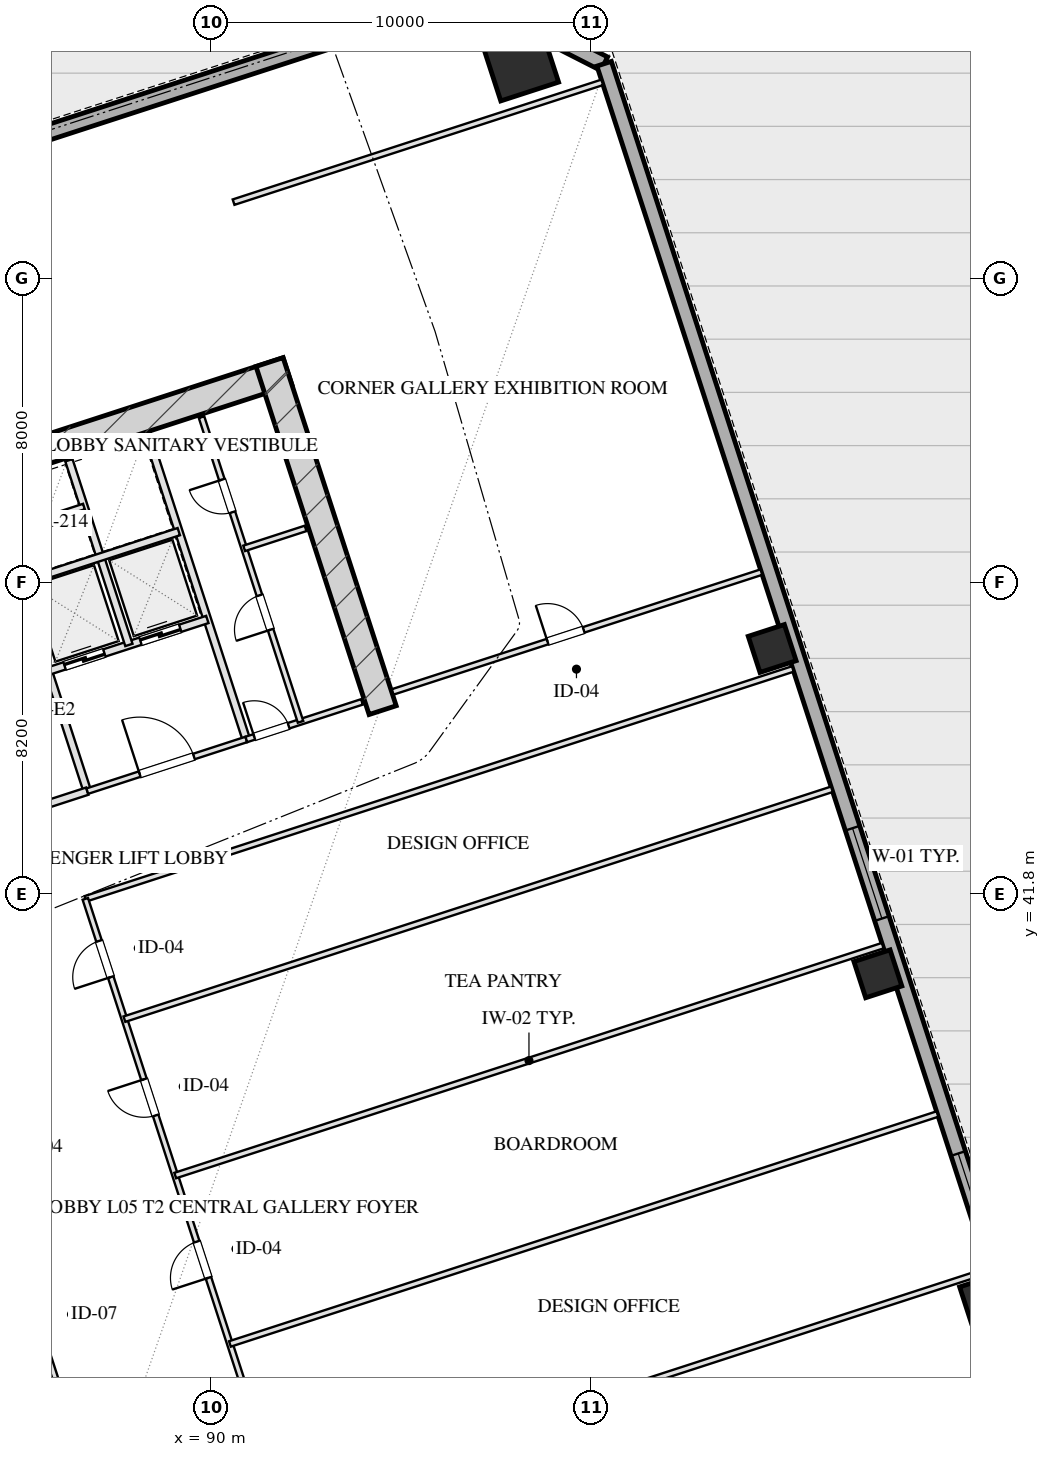
"""IFC4 building model, lengths in metres.
Left out: names, types, materials, properties, quantities, classifications, styles, units other than length and angle.
Written with IfcOpenShell. Run it as: python <this file> out.ifc"""

import sys

from ifc_helpers import new_model, si_unit, direction, frame, frame_2d, origin, origin_2d, place, context, subcontext, project, spatial, rectangle, hollow_rectangle, extrude, element, fill, save


model = new_model("IFC4")
c1 = context("Model", 3, precision=1e-05, world=origin(), true_north=direction((0.0, 1.0)))
c2 = subcontext(c1, "Body", "Model", "MODEL_VIEW")
j1 = project(units=[si_unit("LENGTHUNIT", "METRE"), si_unit("PLANEANGLEUNIT", "RADIAN")], contexts=[c1])
p1 = place(None, origin())
s1 = spatial("IfcSite", under=j1, at=p1, CompositionType="ELEMENT")
p2 = place(p1, origin())
s2 = spatial("IfcBuilding", under=s1, at=p2, CompositionType="ELEMENT")
p3 = place(p2, frame((0.0, 0.0, 26.0)))
s3 = spatial("IfcBuildingStorey", under=s2, at=p3, CompositionType="ELEMENT", Elevation=26.0)
p4 = place(p3, frame((76.272, 50.443, 0.0), z_axis=(0.0, 0.0, 1.0), x_axis=(0.951056072937, 0.309018358888, 0.0)))
e1 = element("IfcWall", 1, at=p4, inside=s3, PredefinedType="SHEAR", context=c2, shape_type="SweptSolid", body=[
    extrude(rectangle(XDim=16.55, YDim=0.75, at=frame_2d((8.275, 0.0))), origin(), (0.0, 0.0, 1.0), 4.0),
])
p5 = place(p3, frame((94.515, 46.639, 0.0), z_axis=(0.0, 0.0, 1.0), x_axis=(-0.309016134813, 0.951056795583, 0.0)))
e2 = element("IfcWall", 2, at=p5, inside=s3, PredefinedType="SHEAR", context=c2, shape_type="SweptSolid", body=[
    extrude(rectangle(XDim=9.63, YDim=0.75, at=frame_2d((4.815, 0.0))), origin(), (0.0, 0.0, 1.0), 4.0),
])
p6 = place(p3, frame((98.137, 63.677, 0.0), z_axis=(0.0, 0.0, 1.0), x_axis=(0.951056516295, 0.309016994375, 0.0)))
e3 = element("IfcColumn", 3, at=p6, inside=s3, PredefinedType="COLUMN", context=c2, shape_type="SweptSolid", body=[
    extrude(hollow_rectangle(XDim=1.6, YDim=1.6, WallThickness=0.055, at=origin_2d()), origin(), (0.0, 0.0, 1.0), 4.001),
])
for number, where, z_axis, x_axis in (
    (4, (110.328, 31.142, 0.0), (0.0, 0.0, 1.0), (0.951, 0.309, 0.0)),
    (5, (107.547, 39.701, 0.0), (0.0, 0.0, 1.0), (0.951, 0.309, 0.0)),
    (6, (104.766, 48.261, 0.0), (0.0, 0.0, 1.0), (0.951, 0.309, 0.0)),
):
    element("IfcColumn", number, at=place(p3, frame(where, z_axis=z_axis, x_axis=x_axis)), inside=s3, PredefinedType="COLUMN", context=c2, shape_type="SweptSolid", body=[
        extrude(hollow_rectangle(XDim=1.0, YDim=1.0, WallThickness=0.036, at=origin_2d()), origin(), (0.0, 0.0, 1.0), 4.001),
    ])
p7 = place(p3, frame((66.002, 55.433, 0.0), z_axis=(0.0, 0.0, 1.0), x_axis=(0.951055939317, 0.309018770125, 0.0)))
e7 = element("IfcWall", 7, at=p7, inside=s3, PredefinedType="SOLIDWALL", context=c2, shape_type="SweptSolid", body=[
    extrude(rectangle(XDim=32.4, YDim=0.4, at=frame_2d((16.2, 0.0))), origin(), (0.0, 0.0, 1.0), 3.16),
])
p8 = place(p3, frame((96.816, 65.446, 0.0), z_axis=(0.0, 0.0, 1.0), x_axis=(0.890998089617, -0.454007053137, 0.0)))
e8 = element("IfcWall", 8, at=p8, inside=s3, PredefinedType="SOLIDWALL", context=c2, shape_type="SweptSolid", body=[
    extrude(rectangle(XDim=3.96, YDim=0.4, at=frame_2d((1.98, 0.0))), origin(), (0.0, 0.0, 1.0), 3.16),
])
p9 = place(p3, frame((100.345, 63.648, 0.0), z_axis=(0.0, 0.0, 1.0), x_axis=(0.309014526607, -0.951057318118, 0.0)))
e9 = element("IfcWall", 9, at=p9, inside=s3, PredefinedType="SOLIDWALL", context=c2, shape_type="SweptSolid", body=[
    extrude(rectangle(XDim=50.0, YDim=0.4, at=frame_2d((25.0, 0.0))), origin(), (0.0, 0.0, 1.0), 3.16),
])
p10 = place(p9, frame((30.15, 0.0, 0.75)))
e10 = element("IfcOpeningElement", 10, at=p10, cuts=e9, PredefinedType="OPENING", context=c2, shape_type="SweptSolid", body=[
    extrude(rectangle(XDim=2.5, YDim=1.75, at=frame_2d((1.25, 0.875))), frame((0.0, 0.21, 0.0), z_axis=(0.0, -1.0, 0.0), x_axis=(1.0, 0.0, 0.0)), (0.0, 0.0, 1.0), 0.42),
])
p11 = place(p9, frame((21.15, 0.0, 0.75)))
e11 = element("IfcOpeningElement", 11, at=p11, cuts=e9, PredefinedType="OPENING", context=c2, shape_type="SweptSolid", body=[
    extrude(rectangle(XDim=2.5, YDim=1.75, at=frame_2d((1.25, 0.875))), frame((0.0, 0.21, 0.0), z_axis=(0.0, -1.0, 0.0), x_axis=(1.0, 0.0, 0.0)), (0.0, 0.0, 1.0), 0.42),
])
p12 = place(p3, frame((86.743, 44.508, 0.0), z_axis=(0.0, 0.0, 1.0), x_axis=(-0.309016001439, 0.951056838919, 0.0)))
e12 = element("IfcWall", 12, at=p12, inside=s3, PredefinedType="PARTITIONING", context=c2, shape_type="SweptSolid", body=[
    extrude(rectangle(XDim=8.43, YDim=0.2, at=frame_2d((4.215, 0.0))), origin(), (0.0, 0.0, 1.0), 3.725),
])
p13 = place(p3, frame((83.101, 43.324, 0.0), z_axis=(0.0, 0.0, 1.0), x_axis=(0.951052804469, 0.309028417967, 0.0)))
e13 = element("IfcWall", 13, at=p13, inside=s3, PredefinedType="PARTITIONING", context=c2, shape_type="SweptSolid", body=[
    extrude(rectangle(XDim=3.83, YDim=0.2, at=frame_2d((1.915, 0.0))), origin(), (0.0, 0.0, 1.0), 3.725),
])
p14 = place(p13, frame((1.35, 0.0, 0.0)))
e14 = element("IfcOpeningElement", 14, at=p14, cuts=e13, PredefinedType="OPENING", context=c2, shape_type="SweptSolid", body=[
    extrude(rectangle(XDim=1.2, YDim=2.05, at=frame_2d((0.6, 1.025))), frame((0.0, 0.11, 0.0), z_axis=(0.0, -1.0, 0.0), x_axis=(1.0, 0.0, 0.0)), (0.0, 0.0, 1.0), 0.22),
])
p15 = place(p3, frame((90.928, 45.868, 0.0), z_axis=(0.0, 0.0, 1.0), x_axis=(-0.309042196757, 0.951048327176, 0.0)))
e15 = element("IfcWall", 15, at=p15, inside=s3, PredefinedType="PARTITIONING", context=c2, shape_type="SweptSolid", body=[
    extrude(rectangle(XDim=8.43, YDim=0.2, at=frame_2d((4.215, 0.0))), origin(), (0.0, 0.0, 1.0), 3.725),
])
p16 = place(p3, frame((86.743, 44.508, 0.0), z_axis=(0.0, 0.0, 1.0), x_axis=(0.951063829732, 0.308994485023, 0.0)))
e16 = element("IfcWall", 16, at=p16, inside=s3, PredefinedType="PARTITIONING", context=c2, shape_type="SweptSolid", body=[
    extrude(rectangle(XDim=4.4, YDim=0.15, at=frame_2d((2.2, 0.0))), origin(), (0.0, 0.0, 1.0), 3.725),
])
p17 = place(p16, frame((1.45, 0.0, 0.0)))
e17 = element("IfcOpeningElement", 17, at=p17, cuts=e16, PredefinedType="OPENING", context=c2, shape_type="SweptSolid", body=[
    extrude(rectangle(XDim=1.5, YDim=2.05, at=frame_2d((0.75, 1.025))), frame((0.0, 0.085, 0.0), z_axis=(0.0, -1.0, 0.0), x_axis=(1.0, 0.0, 0.0)), (0.0, 0.0, 1.0), 0.17),
])
p18 = place(p3, frame((85.718, 47.666, 0.0), z_axis=(0.0, 0.0, 1.0), x_axis=(0.951058531764, 0.30901079133, 0.0)))
e18 = element("IfcWall", 18, at=p18, inside=s3, PredefinedType="PARTITIONING", context=c2, shape_type="SweptSolid", body=[
    extrude(rectangle(XDim=4.4, YDim=0.2, at=frame_2d((2.2, 0.0))), origin(), (0.0, 0.0, 1.0), 3.725),
])
p19 = place(p18, frame((0.45, 0.0, 0.0)))
e19 = element("IfcOpeningElement", 19, at=p19, cuts=e18, PredefinedType="OPENING", context=c2, shape_type="SweptSolid", body=[
    extrude(rectangle(XDim=1.1, YDim=2.05, at=frame_2d((0.55, 1.025))), frame((0.0, 0.11, 0.0), z_axis=(0.0, -1.0, 0.0), x_axis=(1.0, 0.0, 0.0)), (0.0, 0.0, 1.0), 0.22),
])
p20 = place(p18, frame((2.55, 0.0, 0.0)))
e20 = element("IfcOpeningElement", 20, at=p20, cuts=e18, PredefinedType="OPENING", context=c2, shape_type="SweptSolid", body=[
    extrude(rectangle(XDim=1.1, YDim=2.05, at=frame_2d((0.55, 1.025))), frame((0.0, 0.11, 0.0), z_axis=(0.0, -1.0, 0.0), x_axis=(1.0, 0.0, 0.0)), (0.0, 0.0, 1.0), 0.22),
])
p21 = place(p3, frame((87.838, 48.354, 0.0), z_axis=(0.0, 0.0, 1.0), x_axis=(-0.3090093719, 0.951058992953, 0.0)))
e21 = element("IfcWall", 21, at=p21, inside=s3, PredefinedType="PARTITIONING", context=c2, shape_type="SweptSolid", body=[
    extrude(rectangle(XDim=5.11, YDim=0.2, at=frame_2d((2.555, 0.0))), origin(), (0.0, 0.0, 1.0), 3.725),
])
p22 = place(p3, frame((84.967, 49.977, 0.0), z_axis=(0.0, 0.0, 1.0), x_axis=(0.951063829732, 0.308994485023, 0.0)))
e22 = element("IfcWall", 22, at=p22, inside=s3, PredefinedType="PARTITIONING", context=c2, shape_type="SweptSolid", body=[
    extrude(rectangle(XDim=4.4, YDim=0.2, at=frame_2d((2.2, 0.0))), origin(), (0.0, 0.0, 1.0), 3.725),
])
p23 = place(p3, frame((84.534, 51.308, 0.0), z_axis=(0.0, 0.0, 1.0), x_axis=(0.951075093106, 0.308959814982, 0.0)))
e23 = element("IfcWall", 23, at=p23, inside=s3, PredefinedType="PARTITIONING", context=c2, shape_type="SweptSolid", body=[
    extrude(rectangle(XDim=2.23, YDim=0.15, at=frame_2d((1.115, 0.0))), origin(), (0.0, 0.0, 1.0), 3.725),
])
p24 = place(p3, frame((90.928, 45.868, 0.0), z_axis=(0.0, 0.0, 1.0), x_axis=(0.951059297078, 0.309008435874, 0.0)))
e24 = element("IfcWall", 24, at=p24, inside=s3, PredefinedType="PARTITIONING", context=c2, shape_type="SweptSolid", body=[
    extrude(rectangle(XDim=3.2, YDim=0.15, at=frame_2d((1.6, 0.0))), origin(), (0.0, 0.0, 1.0), 3.725),
])
p25 = place(p24, frame((0.22, 0.0, 0.0)))
e25 = element("IfcOpeningElement", 25, at=p25, cuts=e24, PredefinedType="OPENING", context=c2, shape_type="SweptSolid", body=[
    extrude(rectangle(XDim=0.95, YDim=2.05, at=frame_2d((0.475, 1.025))), frame((0.0, 0.085, 0.0), z_axis=(0.0, -1.0, 0.0), x_axis=(1.0, 0.0, 0.0)), (0.0, 0.0, 1.0), 0.17),
])
p26 = place(p3, frame((92.355, 46.331, 0.0), z_axis=(0.0, 0.0, 1.0), x_axis=(-0.309007490203, 0.951059604335, 0.0)))
e26 = element("IfcWall", 26, at=p26, inside=s3, PredefinedType="PARTITIONING", context=c2, shape_type="SweptSolid", body=[
    extrude(rectangle(XDim=8.43, YDim=0.15, at=frame_2d((4.215, 0.0))), origin(), (0.0, 0.0, 1.0), 3.725),
])
p27 = place(p26, frame((2.55, 0.0, 0.0)))
e27 = element("IfcOpeningElement", 27, at=p27, cuts=e26, PredefinedType="OPENING", context=c2, shape_type="SweptSolid", body=[
    extrude(rectangle(XDim=0.95, YDim=2.05, at=frame_2d((0.475, 1.025))), frame((0.0, 0.085, 0.0), z_axis=(0.0, -1.0, 0.0), x_axis=(1.0, 0.0, 0.0)), (0.0, 0.0, 1.0), 0.17),
])
p28 = place(p26, frame((5.8, 0.0, 0.0)))
e28 = element("IfcOpeningElement", 28, at=p28, cuts=e26, PredefinedType="OPENING", context=c2, shape_type="SweptSolid", body=[
    extrude(rectangle(XDim=0.9, YDim=2.05, at=frame_2d((0.45, 1.025))), frame((0.0, 0.085, 0.0), z_axis=(0.0, -1.0, 0.0), x_axis=(1.0, 0.0, 0.0)), (0.0, 0.0, 1.0), 0.17),
])
p29 = place(p3, frame((90.871, 50.896, 0.0), z_axis=(0.0, 0.0, 1.0), x_axis=(0.951054116971, 0.309024378638, 0.0)))
e29 = element("IfcWall", 29, at=p29, inside=s3, PredefinedType="PARTITIONING", context=c2, shape_type="SweptSolid", body=[
    extrude(rectangle(XDim=1.7, YDim=0.15, at=frame_2d((0.85, 0.0))), origin(), (0.0, 0.0, 1.0), 3.725),
])
p30 = place(p3, frame((101.578, 26.196, 0.0), z_axis=(0.0, 0.0, 1.0), x_axis=(0.951059043131, 0.309009217467, 0.0)))
e30 = element("IfcWall", 30, at=p30, inside=s3, PredefinedType="PARTITIONING", context=c2, shape_type="SweptSolid", body=[
    extrude(rectangle(XDim=10.2, YDim=0.15, at=frame_2d((5.1, 0.0))), origin(), (0.0, 0.0, 1.0), 3.725),
])
p31 = place(p30, frame((4.284, 0.0, 0.0)))
e31 = element("IfcOpeningElement", 31, at=p31, cuts=e30, PredefinedType="OPENING", context=c2, shape_type="SweptSolid", body=[
    extrude(rectangle(XDim=1.0, YDim=2.05, at=frame_2d((0.5, 1.025))), frame((0.0, 0.085, 0.0), z_axis=(0.0, -1.0, 0.0), x_axis=(1.0, 0.0, 0.0)), (0.0, 0.0, 1.0), 0.17),
])
p32 = place(p3, frame((90.593, 60.006, 0.0), z_axis=(0.0, 0.0, 1.0), x_axis=(0.951059043131, 0.309009217467, 0.0)))
e32 = element("IfcWall", 32, at=p32, inside=s3, PredefinedType="PARTITIONING", context=c2, shape_type="SweptSolid", body=[
    extrude(rectangle(XDim=10.2, YDim=0.15, at=frame_2d((5.1, 0.0))), origin(), (0.0, 0.0, 1.0), 3.725),
])
p33 = place(p3, frame((94.78, 47.119, 0.0), z_axis=(0.0, 0.0, 1.0), x_axis=(0.951054294345, 0.309023832749, 0.0)))
e33 = element("IfcWall", 33, at=p33, inside=s3, PredefinedType="PARTITIONING", context=c2, shape_type="SweptSolid", body=[
    extrude(rectangle(XDim=10.2, YDim=0.15, at=frame_2d((5.1, 0.0))), origin(), (0.0, 0.0, 1.0), 3.725),
])
p34 = place(p33, frame((4.284, 0.0, 0.0)))
e34 = element("IfcOpeningElement", 34, at=p34, cuts=e33, PredefinedType="OPENING", context=c2, shape_type="SweptSolid", body=[
    extrude(rectangle(XDim=1.0, YDim=2.05, at=frame_2d((0.5, 1.025))), frame((0.0, 0.085, 0.0), z_axis=(0.0, -1.0, 0.0), x_axis=(1.0, 0.0, 0.0)), (0.0, 0.0, 1.0), 0.17),
])
for number, where, z_axis, x_axis in (
    (35, (91.834, 25.848, 0.0), (0.0, 0.0, 1.0), (0.951, 0.309, 0.0)),
    (36, (86.692, 41.673, 0.0), (0.0, 0.0, 1.0), (0.951, 0.309, 0.0)),
):
    element("IfcWall", number, at=place(p3, frame(where, z_axis=z_axis, x_axis=x_axis)), inside=s3, PredefinedType="PARTITIONING", context=c2, shape_type="SweptSolid", body=[
        extrude(rectangle(XDim=19.575, YDim=0.15, at=frame_2d((9.788, 0.0))), origin(), (0.0, 0.0, 1.0), 3.725),
    ])
p35 = place(p3, frame((87.412, 24.411, 0.0), z_axis=(0.0, 0.0, 1.0), x_axis=(-0.309022042254, 0.951054876125, 0.0)))
e37 = element("IfcWall", 37, at=p35, inside=s3, PredefinedType="PARTITIONING", context=c2, shape_type="SweptSolid", body=[
    extrude(rectangle(XDim=16.64, YDim=0.15, at=frame_2d((8.32, 0.0))), origin(), (0.0, 0.0, 1.0), 3.725),
])
p36 = place(p35, frame((1.33, 0.0, 0.0)))
e38 = element("IfcOpeningElement", 38, at=p36, cuts=e37, PredefinedType="OPENING", context=c2, shape_type="SweptSolid", body=[
    extrude(rectangle(XDim=1.0, YDim=2.05, at=frame_2d((0.5, 1.025))), frame((0.0, 0.085, 0.0), z_axis=(0.0, -1.0, 0.0), x_axis=(1.0, 0.0, 0.0)), (0.0, 0.0, 1.0), 0.17),
])
p37 = place(p35, frame((5.83, 0.0, 0.0)))
e39 = element("IfcOpeningElement", 39, at=p37, cuts=e37, PredefinedType="OPENING", context=c2, shape_type="SweptSolid", body=[
    extrude(rectangle(XDim=1.05, YDim=2.05, at=frame_2d((0.525, 1.025))), frame((0.0, 0.085, 0.0), z_axis=(0.0, -1.0, 0.0), x_axis=(1.0, 0.0, 0.0)), (0.0, 0.0, 1.0), 0.17),
])
p38 = place(p35, frame((10.49, 0.0, 0.0)))
e40 = element("IfcOpeningElement", 40, at=p38, cuts=e37, PredefinedType="OPENING", context=c2, shape_type="SweptSolid", body=[
    extrude(rectangle(XDim=1.0, YDim=2.05, at=frame_2d((0.5, 1.025))), frame((0.0, 0.085, 0.0), z_axis=(0.0, -1.0, 0.0), x_axis=(1.0, 0.0, 0.0)), (0.0, 0.0, 1.0), 0.17),
])
p39 = place(p35, frame((14.31, 0.0, 0.0)))
e41 = element("IfcOpeningElement", 41, at=p39, cuts=e37, PredefinedType="OPENING", context=c2, shape_type="SweptSolid", body=[
    extrude(rectangle(XDim=1.0, YDim=2.05, at=frame_2d((0.5, 1.025))), frame((0.0, 0.085, 0.0), z_axis=(0.0, -1.0, 0.0), x_axis=(1.0, 0.0, 0.0)), (0.0, 0.0, 1.0), 0.17),
])
p40 = place(p3, frame((91.834, 25.848, 0.0), z_axis=(0.0, 0.0, 1.0), x_axis=(-0.30901773025, 0.951056277195, 0.0)))
e42 = element("IfcWall", 42, at=p40, inside=s3, PredefinedType="PARTITIONING", context=c2, shape_type="SweptSolid", body=[
    extrude(rectangle(XDim=16.64, YDim=0.15, at=frame_2d((8.32, 0.0))), origin(), (0.0, 0.0, 1.0), 3.725),
])
p41 = place(p40, frame((1.663, 0.0, 0.0)))
e43 = element("IfcOpeningElement", 43, at=p41, cuts=e42, PredefinedType="OPENING", context=c2, shape_type="SweptSolid", body=[
    extrude(rectangle(XDim=1.0, YDim=2.05, at=frame_2d((0.5, 1.025))), frame((0.0, 0.085, 0.0), z_axis=(0.0, -1.0, 0.0), x_axis=(1.0, 0.0, 0.0)), (0.0, 0.0, 1.0), 0.17),
])
p42 = place(p40, frame((6.156, 0.0, 0.0)))
e44 = element("IfcOpeningElement", 44, at=p42, cuts=e42, PredefinedType="OPENING", context=c2, shape_type="SweptSolid", body=[
    extrude(rectangle(XDim=1.0, YDim=2.05, at=frame_2d((0.5, 1.025))), frame((0.0, 0.085, 0.0), z_axis=(0.0, -1.0, 0.0), x_axis=(1.0, 0.0, 0.0)), (0.0, 0.0, 1.0), 0.17),
])
p43 = place(p40, frame((10.649, 0.0, 0.0)))
e45 = element("IfcOpeningElement", 45, at=p43, cuts=e42, PredefinedType="OPENING", context=c2, shape_type="SweptSolid", body=[
    extrude(rectangle(XDim=1.0, YDim=2.05, at=frame_2d((0.5, 1.025))), frame((0.0, 0.085, 0.0), z_axis=(0.0, -1.0, 0.0), x_axis=(1.0, 0.0, 0.0)), (0.0, 0.0, 1.0), 0.17),
])
p44 = place(p40, frame((14.476, 0.0, 0.0)))
e46 = element("IfcOpeningElement", 46, at=p44, cuts=e42, PredefinedType="OPENING", context=c2, shape_type="SweptSolid", body=[
    extrude(rectangle(XDim=1.0, YDim=2.05, at=frame_2d((0.5, 1.025))), frame((0.0, 0.085, 0.0), z_axis=(0.0, -1.0, 0.0), x_axis=(1.0, 0.0, 0.0)), (0.0, 0.0, 1.0), 0.17),
])
for number, where, z_axis, x_axis in (
    (47, (90.497, 29.962, 0.0), (0.0, 0.0, 1.0), (0.951, 0.309, 0.0)),
    (48, (89.057, 34.394, 0.0), (0.0, 0.0, 1.0), (0.951, 0.309, 0.0)),
    (49, (87.72, 38.508, 0.0), (0.0, 0.0, 1.0), (0.951, 0.309, 0.0)),
):
    element("IfcWall", number, at=place(p3, frame(where, z_axis=z_axis, x_axis=x_axis)), inside=s3, PredefinedType="PARTITIONING", context=c2, shape_type="SweptSolid", body=[
        extrude(rectangle(XDim=19.575, YDim=0.15, at=frame_2d((9.788, 0.0))), origin(), (0.0, 0.0, 1.0), 3.725),
    ])
p45 = place(p10, origin())
e50 = element("IfcWindow", 50, at=p45, inside=s3, PartitioningType="TRIPLE_PANEL_VERTICAL", PredefinedType="WINDOW", context=c2, shape_type="SweptSolid", body=[
    extrude(rectangle(XDim=2.5, YDim=1.75, at=frame_2d((1.25, 0.875))), frame((0.0, 0.03, 0.0), z_axis=(0.0, -1.0, 0.0), x_axis=(1.0, 0.0, 0.0)), (0.0, 0.0, 1.0), 0.06),
])
fill(e10, e50)
p46 = place(p11, origin())
e51 = element("IfcWindow", 51, at=p46, inside=s3, PartitioningType="TRIPLE_PANEL_VERTICAL", PredefinedType="WINDOW", context=c2, shape_type="SweptSolid", body=[
    extrude(rectangle(XDim=2.5, YDim=1.75, at=frame_2d((1.25, 0.875))), frame((0.0, 0.03, 0.0), z_axis=(0.0, -1.0, 0.0), x_axis=(1.0, 0.0, 0.0)), (0.0, 0.0, 1.0), 0.06),
])
fill(e11, e51)
p47 = place(p17, origin())
e52 = element("IfcDoor", 52, at=p47, inside=s3, OperationType="SINGLE_SWING_LEFT", PredefinedType="DOOR", context=c2, shape_type="SweptSolid", body=[
    extrude(rectangle(XDim=1.5, YDim=2.05, at=frame_2d((0.75, 1.025))), frame((0.0, 0.025, 0.0), z_axis=(0.0, -1.0, 0.0), x_axis=(1.0, 0.0, 0.0)), (0.0, 0.0, 1.0), 0.05),
])
fill(e17, e52)
p48 = place(p19, origin())
e53 = element("IfcDoor", 53, at=p48, inside=s3, OperationType="DOUBLE_DOOR_SLIDING", PredefinedType="DOOR", context=c2, shape_type="SweptSolid", body=[
    extrude(rectangle(XDim=1.1, YDim=2.05, at=frame_2d((0.55, 1.025))), frame((0.0, 0.025, 0.0), z_axis=(0.0, -1.0, 0.0), x_axis=(1.0, 0.0, 0.0)), (0.0, 0.0, 1.0), 0.05),
])
fill(e19, e53)
p49 = place(p20, origin())
e54 = element("IfcDoor", 54, at=p49, inside=s3, OperationType="DOUBLE_DOOR_SLIDING", PredefinedType="DOOR", context=c2, shape_type="SweptSolid", body=[
    extrude(rectangle(XDim=1.1, YDim=2.05, at=frame_2d((0.55, 1.025))), frame((0.0, 0.025, 0.0), z_axis=(0.0, -1.0, 0.0), x_axis=(1.0, 0.0, 0.0)), (0.0, 0.0, 1.0), 0.05),
])
fill(e20, e54)
p50 = place(p25, origin())
e55 = element("IfcDoor", 55, at=p50, inside=s3, OperationType="SINGLE_SWING_LEFT", PredefinedType="DOOR", context=c2, shape_type="SweptSolid", body=[
    extrude(rectangle(XDim=0.95, YDim=2.05, at=frame_2d((0.475, 1.025))), frame((0.0, 0.025, 0.0), z_axis=(0.0, -1.0, 0.0), x_axis=(1.0, 0.0, 0.0)), (0.0, 0.0, 1.0), 0.05),
])
fill(e25, e55)
p51 = place(p27, origin())
e56 = element("IfcDoor", 56, at=p51, inside=s3, OperationType="SINGLE_SWING_LEFT", PredefinedType="DOOR", context=c2, shape_type="SweptSolid", body=[
    extrude(rectangle(XDim=0.95, YDim=2.05, at=frame_2d((0.475, 1.025))), frame((0.0, 0.025, 0.0), z_axis=(0.0, -1.0, 0.0), x_axis=(1.0, 0.0, 0.0)), (0.0, 0.0, 1.0), 0.05),
])
fill(e27, e56)
p52 = place(p28, origin())
e57 = element("IfcDoor", 57, at=p52, inside=s3, OperationType="SINGLE_SWING_RIGHT", PredefinedType="DOOR", context=c2, shape_type="SweptSolid", body=[
    extrude(rectangle(XDim=0.9, YDim=2.05, at=frame_2d((0.45, 1.025))), frame((0.0, 0.025, 0.0), z_axis=(0.0, -1.0, 0.0), x_axis=(1.0, 0.0, 0.0)), (0.0, 0.0, 1.0), 0.05),
])
fill(e28, e57)
p53 = place(p34, origin())
e58 = element("IfcDoor", 58, at=p53, inside=s3, OperationType="SINGLE_SWING_LEFT", PredefinedType="DOOR", context=c2, shape_type="SweptSolid", body=[
    extrude(rectangle(XDim=1.0, YDim=2.05, at=frame_2d((0.5, 1.025))), frame((0.0, 0.025, 0.0), z_axis=(0.0, -1.0, 0.0), x_axis=(1.0, 0.0, 0.0)), (0.0, 0.0, 1.0), 0.05),
])
fill(e34, e58)
p54 = place(p42, origin())
e59 = element("IfcDoor", 59, at=p54, inside=s3, OperationType="SINGLE_SWING_LEFT", PredefinedType="DOOR", context=c2, shape_type="SweptSolid", body=[
    extrude(rectangle(XDim=1.0, YDim=2.05, at=frame_2d((0.5, 1.025))), frame((0.0, 0.025, 0.0), z_axis=(0.0, -1.0, 0.0), x_axis=(1.0, 0.0, 0.0)), (0.0, 0.0, 1.0), 0.05),
])
fill(e44, e59)
p55 = place(p43, origin())
e60 = element("IfcDoor", 60, at=p55, inside=s3, OperationType="SINGLE_SWING_RIGHT", PredefinedType="DOOR", context=c2, shape_type="SweptSolid", body=[
    extrude(rectangle(XDim=1.0, YDim=2.05, at=frame_2d((0.5, 1.025))), frame((0.0, 0.025, 0.0), z_axis=(0.0, -1.0, 0.0), x_axis=(1.0, 0.0, 0.0)), (0.0, 0.0, 1.0), 0.05),
])
fill(e45, e60)
p56 = place(p44, origin())
e61 = element("IfcDoor", 61, at=p56, inside=s3, OperationType="SINGLE_SWING_LEFT", PredefinedType="DOOR", context=c2, shape_type="SweptSolid", body=[
    extrude(rectangle(XDim=1.0, YDim=2.05, at=frame_2d((0.5, 1.025))), frame((0.0, 0.025, 0.0), z_axis=(0.0, -1.0, 0.0), x_axis=(1.0, 0.0, 0.0)), (0.0, 0.0, 1.0), 0.05),
])
fill(e46, e61)
save(model, sys.argv[1])
